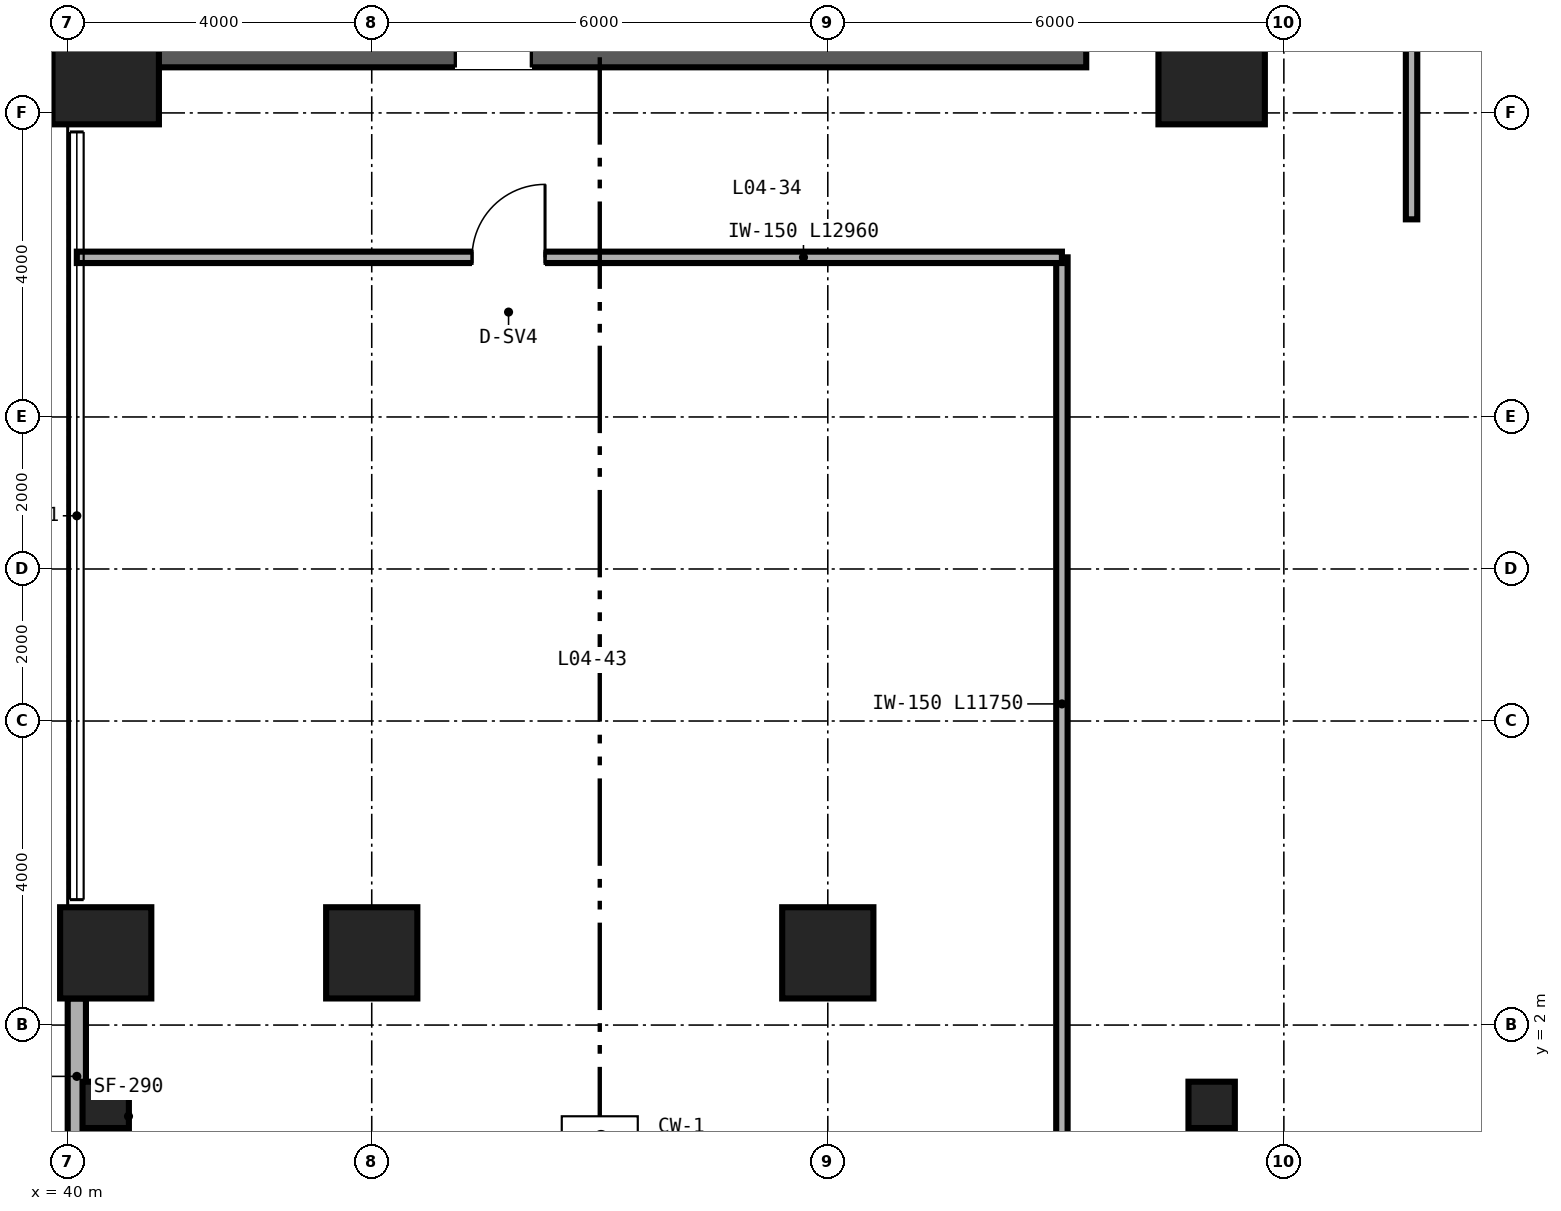
"""IFC4 building model, lengths in metres.
Left out: names, types, materials, properties, quantities, classifications, styles, units other than length and angle.
Written with IfcOpenShell. Run it as: python <this file> out.ifc"""

import sys

from ifc_helpers import new_model, si_unit, direction, frame, frame_2d, origin, origin_2d, place, context, subcontext, project, spatial, rectangle, hollow_circle, extrude, source, transform, mapped, element, fill, save


model = new_model("IFC4")
c1 = context("Model", 3, precision=1e-05, world=origin(), true_north=direction((0.0, 1.0)))
c2 = subcontext(c1, "Body", "Model", "MODEL_VIEW")
j1 = project(units=[si_unit("LENGTHUNIT", "METRE"), si_unit("PLANEANGLEUNIT", "RADIAN")], contexts=[c1])
p1 = place(None, origin())
s1 = spatial("IfcSite", under=j1, at=p1, CompositionType="ELEMENT")
p2 = place(p1, origin())
s2 = spatial("IfcBuilding", under=s1, at=p2, CompositionType="ELEMENT")
p3 = place(p2, frame((0.0, 0.0, 19.2)))
s3 = spatial("IfcBuildingStorey", under=s2, at=p3, CompositionType="ELEMENT", Elevation=19.2)
p4 = place(p3, frame((40.6, 15.0, 0.0), z_axis=(0.0, 0.0, 1.0), x_axis=(1.0, 0.0, 0.0)))
e1 = element("IfcWall", 1, at=p4, inside=s3, PredefinedType="SHEAR", context=c2, shape_type="SweptSolid", body=[
    extrude(rectangle(XDim=12.8, YDim=0.8, at=frame_2d((6.4, 0.0))), origin(), (0.0, 0.0, 1.0), 4.48),
])
p5 = place(p4, frame((4.5, 0.0, 0.0)))
e2 = element("IfcOpeningElement", 2, at=p5, cuts=e1, PredefinedType="OPENING", context=c2, shape_type="SweptSolid", body=[
    extrude(rectangle(XDim=1.0, YDim=2.15, at=frame_2d((0.5, 1.075))), frame((0.0, 0.41, 0.0), z_axis=(0.0, -1.0, 0.0), x_axis=(1.0, 0.0, 0.0)), (0.0, 0.0, 1.0), 0.82),
])
m1 = source(origin(), c2, "Body", "SweptSolid", [
    extrude(hollow_circle(Radius=0.305, WallThickness=0.025, at=origin_2d()), origin(), (0.0, 0.0, 1.0), 4.48),
])
for number, where, z_axis, x_axis in (
    (3, (40.5, 0.95, 0.0), (0.0, 0.0, 1.0), (1.0, 0.0, 0.0)),
    (4, (55.05, 0.95, 0.0), (0.0, 0.0, 1.0), (1.0, 0.0, 0.0)),
):
    element("IfcColumn", number, at=place(p3, frame(where, z_axis=z_axis, x_axis=x_axis)), inside=s3, PredefinedType="COLUMN", context=c2, shape_type="MappedRepresentation", body=[
        mapped(m1, transform((0.0, 0.0, 0.0), scale=1.0)),
    ])
m2 = source(origin(), c2, "Body", "SweptSolid", [
    extrude(rectangle(XDim=1.4, YDim=1.4, at=origin_2d()), origin(), (0.0, 0.0, 1.0), 4.48),
])
for number, where, z_axis, x_axis in (
    (5, (40.5, 14.55, 0.0), (0.0, 0.0, 1.0), (1.0, 0.0, 0.0)),
    (6, (55.05, 14.55, 0.0), (0.0, 0.0, 1.0), (1.0, 0.0, 0.0)),
):
    element("IfcColumn", number, at=place(p3, frame(where, z_axis=z_axis, x_axis=x_axis)), inside=s3, PredefinedType="COLUMN", context=c2, shape_type="MappedRepresentation", body=[
        mapped(m2, transform((0.0, 0.0, 0.0), scale=1.0)),
    ])
m3 = source(origin(), c2, "Body", "SweptSolid", [
    extrude(rectangle(XDim=1.2, YDim=1.2, at=origin_2d()), origin(), (0.0, 0.0, 1.0), 4.48),
])
for number, where, z_axis, x_axis in (
    (7, (40.5, 2.95, 0.0), (0.0, 0.0, 1.0), (1.0, 0.0, 0.0)),
    (8, (44.0, 2.95, 0.0), (0.0, 0.0, 1.0), (1.0, 0.0, 0.0)),
    (9, (50.0, 2.95, 0.0), (0.0, 0.0, 1.0), (1.0, 0.0, 0.0)),
):
    element("IfcColumn", number, at=place(p3, frame(where, z_axis=z_axis, x_axis=x_axis)), inside=s3, PredefinedType="COLUMN", context=c2, shape_type="MappedRepresentation", body=[
        mapped(m3, transform((0.0, 0.0, 0.0), scale=1.0)),
    ])
p6 = place(p3, frame((40.12, 0.3, 0.0), z_axis=(0.0, 0.0, 1.0), x_axis=(0.0, 1.0, 0.0)))
e10 = element("IfcWall", 10, at=p6, inside=s3, PredefinedType="SOLIDWALL", context=c2, shape_type="SweptSolid", body=[
    extrude(rectangle(XDim=2.05, YDim=0.24, at=frame_2d((1.025, 0.0))), origin(), (0.0, 0.0, 1.0), 3.532),
])
p7 = place(p3, frame((57.68, 12.6, 0.0), z_axis=(0.0, 0.0, 1.0), x_axis=(0.0, 1.0, 0.0)))
e11 = element("IfcWall", 11, at=p7, inside=s3, PredefinedType="PARTITIONING", context=c2, shape_type="SweptSolid", body=[
    extrude(rectangle(XDim=31.2, YDim=0.15, at=frame_2d((15.6, 0.0))), origin(), (0.0, 0.0, 1.0), 4.48),
])
p8 = place(p7, frame((3.8, 0.0, 0.0)))
e12 = element("IfcOpeningElement", 12, at=p8, cuts=e11, PredefinedType="OPENING", context=c2, shape_type="SweptSolid", body=[
    extrude(rectangle(XDim=0.96, YDim=2.15, at=frame_2d((0.48, 1.075))), frame((0.0, 0.085, 0.0), z_axis=(0.0, -1.0, 0.0), x_axis=(1.0, 0.0, 0.0)), (0.0, 0.0, 1.0), 0.17),
])
p9 = place(p7, frame((9.8, 0.0, 0.0)))
e13 = element("IfcOpeningElement", 13, at=p9, cuts=e11, PredefinedType="OPENING", context=c2, shape_type="SweptSolid", body=[
    extrude(rectangle(XDim=0.96, YDim=2.15, at=frame_2d((0.48, 1.075))), frame((0.0, 0.085, 0.0), z_axis=(0.0, -1.0, 0.0), x_axis=(1.0, 0.0, 0.0)), (0.0, 0.0, 1.0), 0.17),
])
p10 = place(p7, frame((15.8, 0.0, 0.0)))
e14 = element("IfcOpeningElement", 14, at=p10, cuts=e11, PredefinedType="OPENING", context=c2, shape_type="SweptSolid", body=[
    extrude(rectangle(XDim=0.96, YDim=2.15, at=frame_2d((0.48, 1.075))), frame((0.0, 0.085, 0.0), z_axis=(0.0, -1.0, 0.0), x_axis=(1.0, 0.0, 0.0)), (0.0, 0.0, 1.0), 0.17),
])
p11 = place(p7, frame((21.8, 0.0, 0.0)))
e15 = element("IfcOpeningElement", 15, at=p11, cuts=e11, PredefinedType="OPENING", context=c2, shape_type="SweptSolid", body=[
    extrude(rectangle(XDim=0.96, YDim=2.15, at=frame_2d((0.48, 1.075))), frame((0.0, 0.085, 0.0), z_axis=(0.0, -1.0, 0.0), x_axis=(1.0, 0.0, 0.0)), (0.0, 0.0, 1.0), 0.17),
])
p12 = place(p3, frame((53.08, 0.35, 0.0), z_axis=(0.0, 0.0, 1.0), x_axis=(0.0, 1.0, 0.0)))
e16 = element("IfcWall", 16, at=p12, inside=s3, PredefinedType="PARTITIONING", context=c2, shape_type="SweptSolid", body=[
    extrude(rectangle(XDim=11.75, YDim=0.15, at=frame_2d((5.875, 0.0))), origin(), (0.0, 0.0, 1.0), 3.553),
])
p13 = place(p3, frame((40.12, 12.1, 0.0), z_axis=(0.0, 0.0, 1.0), x_axis=(1.0, 0.0, 0.0)))
e17 = element("IfcWall", 17, at=p13, inside=s3, PredefinedType="PARTITIONING", context=c2, shape_type="SweptSolid", body=[
    extrude(rectangle(XDim=12.96, YDim=0.15, at=frame_2d((6.48, 0.0))), origin(), (0.0, 0.0, 1.0), 3.701),
])
p14 = place(p13, frame((5.2, 0.0, 0.0)))
e18 = element("IfcOpeningElement", 18, at=p14, cuts=e17, PredefinedType="OPENING", context=c2, shape_type="SweptSolid", body=[
    extrude(rectangle(XDim=0.96, YDim=2.15, at=frame_2d((0.48, 1.075))), frame((0.0, 0.085, 0.0), z_axis=(0.0, -1.0, 0.0), x_axis=(1.0, 0.0, 0.0)), (0.0, 0.0, 1.0), 0.17),
])
m4 = source(origin(), c2, "Body", "SweptSolid", [
    extrude(rectangle(XDim=0.96, YDim=2.15, at=frame_2d((0.48, 1.075))), frame((0.0, 0.025, 0.0), z_axis=(0.0, -1.0, 0.0), x_axis=(1.0, 0.0, 0.0)), (0.0, 0.0, 1.0), 0.05),
])
p15 = place(p14, origin())
e19 = element("IfcDoor", 19, at=p15, inside=s3, OperationType="SINGLE_SWING_RIGHT", PredefinedType="DOOR", context=c2, shape_type="MappedRepresentation", body=[
    mapped(m4, transform((0.0, 0.0, 0.0), scale=1.0)),
])
fill(e18, e19)
save(model, sys.argv[1])
